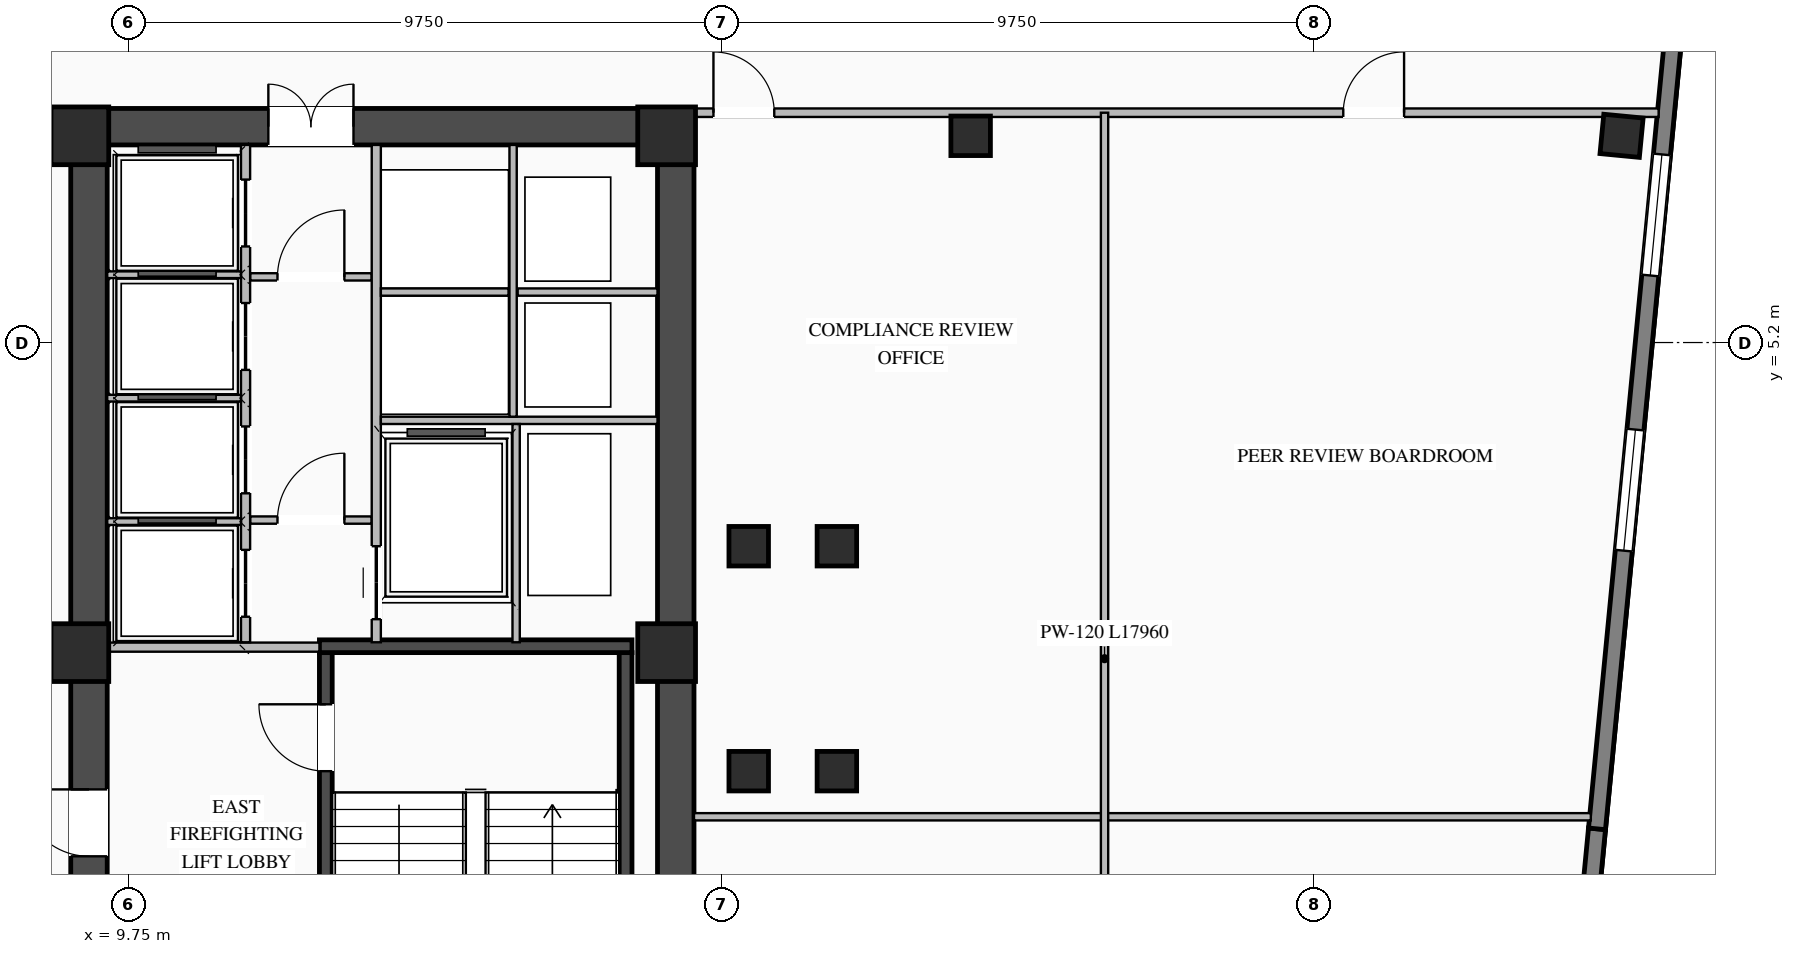
"""IFC4 building model, lengths in metres.
Left out: names, types, materials, properties, quantities, classifications, styles, units other than length and angle.
Written with IfcOpenShell. Run it as: python <this file> out.ifc"""

import sys

from ifc_helpers import new_model, si_unit, direction, frame, frame_2d, origin, origin_2d, place, context, subcontext, project, spatial, rectangle, i_section, extrude, element, fill, save


model = new_model("IFC4")
c1 = context("Model", 3, precision=1e-05, world=origin(), true_north=direction((0.0, 1.0)))
c2 = subcontext(c1, "Body", "Model", "MODEL_VIEW")
j1 = project(units=[si_unit("LENGTHUNIT", "METRE"), si_unit("PLANEANGLEUNIT", "RADIAN")], contexts=[c1])
p1 = place(None, origin())
s1 = spatial("IfcSite", under=j1, at=p1, CompositionType="ELEMENT")
p2 = place(p1, origin())
s2 = spatial("IfcBuilding", under=s1, at=p2, CompositionType="ELEMENT")
p3 = place(p2, frame((0.0, 0.0, 188.0)))
s3 = spatial("IfcBuildingStorey", under=s2, at=p3, CompositionType="ELEMENT", Elevation=188.0)
p4 = place(p3, frame((8.8, 8.75, 0.0), z_axis=(0.0, 0.0, 1.0), x_axis=(1.0, 0.0, 0.0)))
e1 = element("IfcWall", 1, at=p4, inside=s3, PredefinedType="SHEAR", context=c2, shape_type="SweptSolid", body=[
    extrude(rectangle(XDim=10.25, YDim=0.6, at=frame_2d((5.125, 0.0))), origin(), (0.0, 0.0, 1.0), 3.27),
])
p5 = place(p4, frame((3.25, 0.0, 0.0)))
e2 = element("IfcOpeningElement", 2, at=p5, cuts=e1, PredefinedType="OPENING", context=c2, shape_type="SweptSolid", body=[
    extrude(rectangle(XDim=1.4, YDim=2.05, at=frame_2d((0.7, 1.025))), frame((0.0, 0.31, 0.0), z_axis=(0.0, -1.0, 0.0), x_axis=(1.0, 0.0, 0.0)), (0.0, 0.0, 1.0), 0.62),
])
p6 = place(p3, frame((9.1, -8.45, 0.0), z_axis=(0.0, 0.0, 1.0), x_axis=(0.0, 1.0, 0.0)))
e3 = element("IfcWall", 3, at=p6, inside=s3, PredefinedType="SHEAR", context=c2, shape_type="SweptSolid", body=[
    extrude(rectangle(XDim=16.9, YDim=0.6, at=frame_2d((8.45, 0.0))), origin(), (0.0, 0.0, 1.0), 3.27),
])
p7 = place(p6, frame((5.2, 0.0, 0.0)))
e4 = element("IfcOpeningElement", 4, at=p7, cuts=e3, PredefinedType="OPENING", context=c2, shape_type="SweptSolid", body=[
    extrude(rectangle(XDim=1.1, YDim=2.08, at=frame_2d((0.55, 1.04))), frame((0.0, 0.31, 0.0), z_axis=(0.0, -1.0, 0.0), x_axis=(1.0, 0.0, 0.0)), (0.0, 0.0, 1.0), 0.62),
])
p8 = place(p3, frame((18.75, -8.45, 0.0), z_axis=(0.0, 0.0, 1.0), x_axis=(0.0, 1.0, 0.0)))
e5 = element("IfcWall", 5, at=p8, inside=s3, PredefinedType="SHEAR", context=c2, shape_type="SweptSolid", body=[
    extrude(rectangle(XDim=16.9, YDim=0.6, at=frame_2d((8.45, 0.0))), origin(), (0.0, 0.0, 1.0), 3.27),
])
p9 = place(p3, frame((12.995, -8.1, 0.0), z_axis=(0.0, 0.0, 1.0), x_axis=(0.0, 1.0, 0.0)))
e6 = element("IfcWall", 6, at=p9, inside=s3, PredefinedType="SHEAR", context=c2, shape_type="SweptSolid", body=[
    extrude(rectangle(XDim=8.2, YDim=0.21, at=frame_2d((4.1, 0.0))), origin(), (0.0, 0.0, 1.0), 3.27),
])
p10 = place(p9, frame((6.25, 0.0, 0.0)))
e7 = element("IfcOpeningElement", 7, at=p10, cuts=e6, PredefinedType="OPENING", context=c2, shape_type="SweptSolid", body=[
    extrude(rectangle(XDim=1.1, YDim=2.15, at=frame_2d((0.55, 1.075))), frame((0.0, 0.115, 0.0), z_axis=(0.0, -1.0, 0.0), x_axis=(1.0, 0.0, 0.0)), (0.0, 0.0, 1.0), 0.23),
])
p11 = place(p3, frame((17.925, -8.1, 0.0), z_axis=(0.0, 0.0, 1.0), x_axis=(0.0, 1.0, 0.0)))
e8 = element("IfcWall", 8, at=p11, inside=s3, PredefinedType="SHEAR", context=c2, shape_type="SweptSolid", body=[
    extrude(rectangle(XDim=8.2, YDim=0.21, at=frame_2d((4.1, 0.0))), origin(), (0.0, 0.0, 1.0), 3.27),
])
p12 = place(p3, frame((18.03, 0.205, 0.0), z_axis=(0.0, 0.0, 1.0), x_axis=(-1.0, 0.0, 0.0)))
e9 = element("IfcWall", 9, at=p12, inside=s3, PredefinedType="SHEAR", context=c2, shape_type="SweptSolid", body=[
    extrude(rectangle(XDim=5.14, YDim=0.21, at=frame_2d((2.57, 0.0))), origin(), (0.0, 0.0, 1.0), 3.27),
])
for number, where, z_axis, x_axis in (
    (10, (8.95, 0.1, 0.0), (0.0, 0.0, 1.0), (1.0, 0.0, 0.0)),
    (11, (8.95, 8.6, 0.0), (0.0, 0.0, 1.0), (1.0, 0.0, 0.0)),
    (12, (18.6, 0.1, 0.0), (0.0, 0.0, 1.0), (1.0, 0.0, 0.0)),
    (13, (18.6, 8.6, 0.0), (0.0, 0.0, 1.0), (1.0, 0.0, 0.0)),
):
    element("IfcColumn", number, at=place(p3, frame(where, z_axis=z_axis, x_axis=x_axis)), inside=s3, PredefinedType="COLUMN", context=c2, shape_type="SweptSolid", body=[
        extrude(rectangle(XDim=0.95, YDim=0.95, at=origin_2d()), origin(), (0.0, 0.0, 1.0), 3.45),
    ])
for number, where, z_axis, x_axis in (
    (14, (19.95, -1.85, 0.0), (0.0, 0.0, 1.0), (1.0, 0.0, 0.0)),
    (15, (19.95, 1.85, 0.0), (0.0, 0.0, 1.0), (1.0, 0.0, 0.0)),
    (16, (21.4, -1.85, 0.0), (0.0, 0.0, 1.0), (1.0, 0.0, 0.0)),
    (17, (21.4, 1.85, 0.0), (0.0, 0.0, 1.0), (1.0, 0.0, 0.0)),
    (18, (23.6, 8.6, 0.0), (0.0, 0.0, 1.0), (1.0, 0.0, 0.0)),
    (19, (34.305, 8.6, 0.0), (0.0, 0.0, 1.0), (0.995, -0.096, 0.0)),
):
    element("IfcColumn", number, at=place(p3, frame(where, z_axis=z_axis, x_axis=x_axis)), inside=s3, PredefinedType="COLUMN", context=c2, shape_type="SweptSolid", body=[
        extrude(i_section(OverallWidth=0.65, OverallDepth=0.65, WebThickness=0.028, FlangeThickness=0.04, at=origin_2d()), origin(), (0.0, 0.0, 1.0), 3.45),
    ])
p13 = place(p3, frame((33.901, -2.798, 0.0), z_axis=(0.0, 0.0, 1.0), x_axis=(-0.095853434568, -0.99539545864, 0.0)))
e20 = element("IfcWall", 20, at=p13, inside=s3, PredefinedType="STANDARD", context=c2, shape_type="SweptSolid", body=[
    extrude(rectangle(XDim=16.79, YDim=0.28, at=frame_2d((8.395, 0.0))), origin(), (0.0, 0.0, 1.0), 3.25),
])
p14 = place(p13, frame((3.547, 0.0, 0.76)))
e21 = element("IfcOpeningElement", 21, at=p14, cuts=e20, PredefinedType="OPENING", context=c2, shape_type="SweptSolid", body=[
    extrude(rectangle(XDim=2.0, YDim=2.05, at=frame_2d((1.0, 1.025))), frame((0.0, 0.15, 0.0), z_axis=(0.0, -1.0, 0.0), x_axis=(1.0, 0.0, 0.0)), (0.0, 0.0, 1.0), 0.3),
])
p15 = place(p13, frame((10.193, 0.0, 0.76)))
e22 = element("IfcOpeningElement", 22, at=p15, cuts=e20, PredefinedType="OPENING", context=c2, shape_type="SweptSolid", body=[
    extrude(rectangle(XDim=2.0, YDim=2.05, at=frame_2d((1.0, 1.025))), frame((0.0, 0.15, 0.0), z_axis=(0.0, -1.0, 0.0), x_axis=(1.0, 0.0, 0.0)), (0.0, 0.0, 1.0), 0.3),
])
p16 = place(p3, frame((35.51, 13.914, 0.0), z_axis=(0.0, 0.0, 1.0), x_axis=(-0.095839027265, -0.995396845913, 0.0)))
e23 = element("IfcWall", 23, at=p16, inside=s3, PredefinedType="STANDARD", context=c2, shape_type="SweptSolid", body=[
    extrude(rectangle(XDim=16.79, YDim=0.28, at=frame_2d((8.395, 0.0))), origin(), (0.0, 0.0, 1.0), 3.25),
])
p17 = place(p16, frame((5.647, 0.0, 0.76)))
e24 = element("IfcOpeningElement", 24, at=p17, cuts=e23, PredefinedType="OPENING", context=c2, shape_type="SweptSolid", body=[
    extrude(rectangle(XDim=2.0, YDim=2.05, at=frame_2d((1.0, 1.025))), frame((0.0, 0.15, 0.0), z_axis=(0.0, -1.0, 0.0), x_axis=(1.0, 0.0, 0.0)), (0.0, 0.0, 1.0), 0.3),
])
p18 = place(p16, frame((10.193, 0.0, 0.76)))
e25 = element("IfcOpeningElement", 25, at=p18, cuts=e23, PredefinedType="OPENING", context=c2, shape_type="SweptSolid", body=[
    extrude(rectangle(XDim=2.0, YDim=2.05, at=frame_2d((1.0, 1.025))), frame((0.0, 0.15, 0.0), z_axis=(0.0, -1.0, 0.0), x_axis=(1.0, 0.0, 0.0)), (0.0, 0.0, 1.0), 0.3),
])
p19 = place(p3, frame((9.4, 0.19, 0.0), z_axis=(0.0, 0.0, 1.0), x_axis=(1.0, 0.0, 0.0)))
e26 = element("IfcWall", 26, at=p19, inside=s3, PredefinedType="STANDARD", context=c2, shape_type="SweptSolid", body=[
    extrude(rectangle(XDim=3.49, YDim=0.15, at=frame_2d((1.745, 0.0))), origin(), (0.0, 0.0, 1.0), 2.645),
])
p20 = place(p3, frame((11.75, 2.28, 0.0), z_axis=(0.0, 0.0, 1.0), x_axis=(1.0, 0.0, 0.0)))
e27 = element("IfcWall", 27, at=p20, inside=s3, PredefinedType="STANDARD", context=c2, shape_type="SweptSolid", body=[
    extrude(rectangle(XDim=2.0, YDim=0.12, at=frame_2d((1.0, 0.0))), origin(), (0.0, 0.0, 1.0), 3.25),
])
p21 = place(p20, frame((0.45, 0.0, 0.0)))
e28 = element("IfcOpeningElement", 28, at=p21, cuts=e27, PredefinedType="OPENING", context=c2, shape_type="SweptSolid", body=[
    extrude(rectangle(XDim=1.1, YDim=2.1, at=frame_2d((0.55, 1.05))), frame((0.0, 0.07, 0.0), z_axis=(0.0, -1.0, 0.0), x_axis=(1.0, 0.0, 0.0)), (0.0, 0.0, 1.0), 0.14),
])
p22 = place(p3, frame((11.75, 6.28, 0.0), z_axis=(0.0, 0.0, 1.0), x_axis=(1.0, 0.0, 0.0)))
e29 = element("IfcWall", 29, at=p22, inside=s3, PredefinedType="STANDARD", context=c2, shape_type="SweptSolid", body=[
    extrude(rectangle(XDim=2.0, YDim=0.12, at=frame_2d((1.0, 0.0))), origin(), (0.0, 0.0, 1.0), 3.25),
])
p23 = place(p22, frame((0.45, 0.0, 0.0)))
e30 = element("IfcOpeningElement", 30, at=p23, cuts=e29, PredefinedType="OPENING", context=c2, shape_type="SweptSolid", body=[
    extrude(rectangle(XDim=1.1, YDim=2.1, at=frame_2d((0.55, 1.05))), frame((0.0, 0.07, 0.0), z_axis=(0.0, -1.0, 0.0), x_axis=(1.0, 0.0, 0.0)), (0.0, 0.0, 1.0), 0.14),
])
p24 = place(p3, frame((11.675, 0.27, 0.0), z_axis=(0.0, 0.0, 1.0), x_axis=(0.0, 1.0, 0.0)))
e31 = element("IfcWall", 31, at=p24, inside=s3, PredefinedType="STANDARD", context=c2, shape_type="SweptSolid", body=[
    extrude(rectangle(XDim=8.18, YDim=0.15, at=frame_2d((4.09, 0.0))), origin(), (0.0, 0.0, 1.0), 3.25),
])
p25 = place(p24, frame((0.42, 0.0, 0.0)))
e32 = element("IfcOpeningElement", 32, at=p25, cuts=e31, PredefinedType="OPENING", context=c2, shape_type="SweptSolid", body=[
    extrude(rectangle(XDim=1.1, YDim=2.1, at=frame_2d((0.55, 1.05))), frame((0.0, 0.085, 0.0), z_axis=(0.0, -1.0, 0.0), x_axis=(1.0, 0.0, 0.0)), (0.0, 0.0, 1.0), 0.17),
])
p26 = place(p24, frame((2.45, 0.0, 0.0)))
e33 = element("IfcOpeningElement", 33, at=p26, cuts=e31, PredefinedType="OPENING", context=c2, shape_type="SweptSolid", body=[
    extrude(rectangle(XDim=1.1, YDim=2.1, at=frame_2d((0.55, 1.05))), frame((0.0, 0.085, 0.0), z_axis=(0.0, -1.0, 0.0), x_axis=(1.0, 0.0, 0.0)), (0.0, 0.0, 1.0), 0.17),
])
p27 = place(p24, frame((4.48, 0.0, 0.0)))
e34 = element("IfcOpeningElement", 34, at=p27, cuts=e31, PredefinedType="OPENING", context=c2, shape_type="SweptSolid", body=[
    extrude(rectangle(XDim=1.1, YDim=2.1, at=frame_2d((0.55, 1.05))), frame((0.0, 0.085, 0.0), z_axis=(0.0, -1.0, 0.0), x_axis=(1.0, 0.0, 0.0)), (0.0, 0.0, 1.0), 0.17),
])
p28 = place(p24, frame((6.51, 0.0, 0.0)))
e35 = element("IfcOpeningElement", 35, at=p28, cuts=e31, PredefinedType="OPENING", context=c2, shape_type="SweptSolid", body=[
    extrude(rectangle(XDim=1.1, YDim=2.1, at=frame_2d((0.55, 1.05))), frame((0.0, 0.085, 0.0), z_axis=(0.0, -1.0, 0.0), x_axis=(1.0, 0.0, 0.0)), (0.0, 0.0, 1.0), 0.17),
])
for number, where, z_axis, x_axis in (
    (36, (9.4, 2.255, 0.0), (0.0, 0.0, 1.0), (1.0, 0.0, 0.0)),
    (37, (9.4, 4.285, 0.0), (0.0, 0.0, 1.0), (1.0, 0.0, 0.0)),
    (38, (9.4, 6.315, 0.0), (0.0, 0.0, 1.0), (1.0, 0.0, 0.0)),
):
    element("IfcWall", number, at=place(p3, frame(where, z_axis=z_axis, x_axis=x_axis)), inside=s3, PredefinedType="STANDARD", context=c2, shape_type="SweptSolid", body=[
        extrude(rectangle(XDim=2.2, YDim=0.11, at=frame_2d((1.1, 0.0))), origin(), (0.0, 0.0, 1.0), 3.25),
    ])
p29 = place(p3, frame((13.825, 0.27, 0.0), z_axis=(0.0, 0.0, 1.0), x_axis=(0.0, 1.0, 0.0)))
e39 = element("IfcWall", 39, at=p29, inside=s3, PredefinedType="STANDARD", context=c2, shape_type="SweptSolid", body=[
    extrude(rectangle(XDim=8.18, YDim=0.15, at=frame_2d((4.09, 0.0))), origin(), (0.0, 0.0, 1.0), 3.25),
])
p30 = place(p29, frame((0.38, 0.0, 0.0)))
e40 = element("IfcOpeningElement", 40, at=p30, cuts=e39, PredefinedType="OPENING", context=c2, shape_type="SweptSolid", body=[
    extrude(rectangle(XDim=1.2, YDim=2.1, at=frame_2d((0.6, 1.05))), frame((0.0, 0.085, 0.0), z_axis=(0.0, -1.0, 0.0), x_axis=(1.0, 0.0, 0.0)), (0.0, 0.0, 1.0), 0.17),
])
p31 = place(p3, frame((13.9, 3.92, 0.0), z_axis=(0.0, 0.0, 1.0), x_axis=(1.0, 0.0, 0.0)))
e41 = element("IfcWall", 41, at=p31, inside=s3, PredefinedType="STANDARD", context=c2, shape_type="SweptSolid", body=[
    extrude(rectangle(XDim=4.55, YDim=0.12, at=frame_2d((2.275, 0.0))), origin(), (0.0, 0.0, 1.0), 3.25),
])
p32 = place(p3, frame((16.15, 6.03, 0.0), z_axis=(0.0, 0.0, 1.0), x_axis=(1.0, 0.0, 0.0)))
e42 = element("IfcWall", 42, at=p32, inside=s3, PredefinedType="STANDARD", context=c2, shape_type="SweptSolid", body=[
    extrude(rectangle(XDim=2.3, YDim=0.12, at=frame_2d((1.15, 0.0))), origin(), (0.0, 0.0, 1.0), 3.25),
])
p33 = place(p3, frame((16.075, 3.98, 0.0), z_axis=(0.0, 0.0, 1.0), x_axis=(0.0, 1.0, 0.0)))
e43 = element("IfcWall", 43, at=p33, inside=s3, PredefinedType="STANDARD", context=c2, shape_type="SweptSolid", body=[
    extrude(rectangle(XDim=4.47, YDim=0.12, at=frame_2d((2.235, 0.0))), origin(), (0.0, 0.0, 1.0), 3.25),
])
p34 = place(p3, frame((13.9, 6.03, 0.0), z_axis=(0.0, 0.0, 1.0), x_axis=(1.0, 0.0, 0.0)))
e44 = element("IfcWall", 44, at=p34, inside=s3, PredefinedType="STANDARD", context=c2, shape_type="SweptSolid", body=[
    extrude(rectangle(XDim=2.1, YDim=0.12, at=frame_2d((1.05, 0.0))), origin(), (0.0, 0.0, 1.0), 3.25),
])
p35 = place(p3, frame((16.125, 0.27, 0.0), z_axis=(0.0, 0.0, 1.0), x_axis=(0.0, 1.0, 0.0)))
e45 = element("IfcWall", 45, at=p35, inside=s3, PredefinedType="STANDARD", context=c2, shape_type="SweptSolid", body=[
    extrude(rectangle(XDim=3.59, YDim=0.12, at=frame_2d((1.795, 0.0))), origin(), (0.0, 0.0, 1.0), 3.25),
])
p36 = place(p3, frame((19.05, 8.98, 0.0), z_axis=(0.0, 0.0, 1.0), x_axis=(1.0, 0.0, 0.0)))
e46 = element("IfcWall", 46, at=p36, inside=s3, PredefinedType="STANDARD", context=c2, shape_type="SweptSolid", body=[
    extrude(rectangle(XDim=15.864, YDim=0.14, at=frame_2d((7.932, 0.0))), origin(), (0.0, 0.0, 1.0), 3.25),
])
p37 = place(p36, frame((0.32, 0.0, 0.0)))
e47 = element("IfcOpeningElement", 47, at=p37, cuts=e46, PredefinedType="OPENING", context=c2, shape_type="SweptSolid", body=[
    extrude(rectangle(XDim=1.0, YDim=2.08, at=frame_2d((0.5, 1.04))), frame((0.0, 0.08, 0.0), z_axis=(0.0, -1.0, 0.0), x_axis=(1.0, 0.0, 0.0)), (0.0, 0.0, 1.0), 0.16),
])
p38 = place(p36, frame((10.678, 0.0, 0.0)))
e48 = element("IfcOpeningElement", 48, at=p38, cuts=e46, PredefinedType="OPENING", context=c2, shape_type="SweptSolid", body=[
    extrude(rectangle(XDim=1.0, YDim=2.08, at=frame_2d((0.5, 1.04))), frame((0.0, 0.08, 0.0), z_axis=(0.0, -1.0, 0.0), x_axis=(1.0, 0.0, 0.0)), (0.0, 0.0, 1.0), 0.16),
])
p39 = place(p3, frame((19.05, -2.6, 0.0), z_axis=(0.0, 0.0, 1.0), x_axis=(1.0, 0.0, 0.0)))
e49 = element("IfcWall", 49, at=p39, inside=s3, PredefinedType="STANDARD", context=c2, shape_type="SweptSolid", body=[
    extrude(rectangle(XDim=14.749, YDim=0.12, at=frame_2d((7.375, 0.0))), origin(), (0.0, 0.0, 1.0), 3.25),
])
p40 = place(p3, frame((25.802, -8.98, 0.0), z_axis=(0.0, 0.0, 1.0), x_axis=(0.0, 1.0, 0.0)))
e50 = element("IfcWall", 50, at=p40, inside=s3, PredefinedType="STANDARD", context=c2, shape_type="SweptSolid", body=[
    extrude(rectangle(XDim=17.96, YDim=0.12, at=frame_2d((8.98, 0.0))), origin(), (0.0, 0.0, 1.0), 3.25),
])
p41 = place(p17, origin())
e51 = element("IfcWindow", 51, at=p41, inside=s3, PartitioningType="DOUBLE_PANEL_VERTICAL", PredefinedType="WINDOW", context=c2, shape_type="SweptSolid", body=[
    extrude(rectangle(XDim=2.0, YDim=2.05, at=frame_2d((1.0, 1.025))), frame((0.0, 0.03, 0.0), z_axis=(0.0, -1.0, 0.0), x_axis=(1.0, 0.0, 0.0)), (0.0, 0.0, 1.0), 0.06),
])
fill(e24, e51)
p42 = place(p18, origin())
e52 = element("IfcWindow", 52, at=p42, inside=s3, PartitioningType="DOUBLE_PANEL_VERTICAL", PredefinedType="WINDOW", context=c2, shape_type="SweptSolid", body=[
    extrude(rectangle(XDim=2.0, YDim=2.05, at=frame_2d((1.0, 1.025))), frame((0.0, 0.03, 0.0), z_axis=(0.0, -1.0, 0.0), x_axis=(1.0, 0.0, 0.0)), (0.0, 0.0, 1.0), 0.06),
])
fill(e25, e52)
p43 = place(p10, origin())
e53 = element("IfcDoor", 53, at=p43, inside=s3, OperationType="SINGLE_SWING_RIGHT", PredefinedType="DOOR", context=c2, shape_type="SweptSolid", body=[
    extrude(rectangle(XDim=1.1, YDim=2.15, at=frame_2d((0.55, 1.075))), frame((0.0, 0.025, 0.0), z_axis=(0.0, -1.0, 0.0), x_axis=(1.0, 0.0, 0.0)), (0.0, 0.0, 1.0), 0.05),
])
fill(e7, e53)
p44 = place(p7, origin())
e54 = element("IfcDoor", 54, at=p44, inside=s3, OperationType="SINGLE_SWING_RIGHT", PredefinedType="DOOR", context=c2, shape_type="SweptSolid", body=[
    extrude(rectangle(XDim=1.1, YDim=2.08, at=frame_2d((0.55, 1.04))), frame((0.0, -0.205, 0.0), z_axis=(0.0, -1.0, 0.0), x_axis=(1.0, 0.0, 0.0)), (0.0, 0.0, 1.0), 0.05),
])
fill(e4, e54)
p45 = place(p21, origin())
e55 = element("IfcDoor", 55, at=p45, inside=s3, OperationType="SINGLE_SWING_RIGHT", PredefinedType="DOOR", context=c2, shape_type="SweptSolid", body=[
    extrude(rectangle(XDim=1.1, YDim=2.1, at=frame_2d((0.55, 1.05))), frame((0.0, 0.025, 0.0), z_axis=(0.0, -1.0, 0.0), x_axis=(1.0, 0.0, 0.0)), (0.0, 0.0, 1.0), 0.05),
])
fill(e28, e55)
p46 = place(p23, origin())
e56 = element("IfcDoor", 56, at=p46, inside=s3, OperationType="SINGLE_SWING_RIGHT", PredefinedType="DOOR", context=c2, shape_type="SweptSolid", body=[
    extrude(rectangle(XDim=1.1, YDim=2.1, at=frame_2d((0.55, 1.05))), frame((0.0, 0.025, 0.0), z_axis=(0.0, -1.0, 0.0), x_axis=(1.0, 0.0, 0.0)), (0.0, 0.0, 1.0), 0.05),
])
fill(e30, e56)
p47 = place(p5, origin())
e57 = element("IfcDoor", 57, at=p47, inside=s3, OperationType="DOUBLE_DOOR_SINGLE_SWING", PredefinedType="DOOR", context=c2, shape_type="SweptSolid", body=[
    extrude(rectangle(XDim=1.4, YDim=2.05, at=frame_2d((0.7, 1.025))), frame((0.0, 0.245, 0.0), z_axis=(0.0, -1.0, 0.0), x_axis=(1.0, 0.0, 0.0)), (0.0, 0.0, 1.0), 0.05),
])
fill(e2, e57)
p48 = place(p25, origin())
e58 = element("IfcDoor", 58, at=p48, inside=s3, OperationType="DOUBLE_DOOR_SLIDING", PredefinedType="DOOR", context=c2, shape_type="SweptSolid", body=[
    extrude(rectangle(XDim=1.1, YDim=2.1, at=frame_2d((0.55, 1.05))), frame((0.0, 0.025, 0.0), z_axis=(0.0, -1.0, 0.0), x_axis=(1.0, 0.0, 0.0)), (0.0, 0.0, 1.0), 0.05),
])
fill(e32, e58)
p49 = place(p26, origin())
e59 = element("IfcDoor", 59, at=p49, inside=s3, OperationType="DOUBLE_DOOR_SLIDING", PredefinedType="DOOR", context=c2, shape_type="SweptSolid", body=[
    extrude(rectangle(XDim=1.1, YDim=2.1, at=frame_2d((0.55, 1.05))), frame((0.0, 0.025, 0.0), z_axis=(0.0, -1.0, 0.0), x_axis=(1.0, 0.0, 0.0)), (0.0, 0.0, 1.0), 0.05),
])
fill(e33, e59)
p50 = place(p27, origin())
e60 = element("IfcDoor", 60, at=p50, inside=s3, OperationType="DOUBLE_DOOR_SLIDING", PredefinedType="DOOR", context=c2, shape_type="SweptSolid", body=[
    extrude(rectangle(XDim=1.1, YDim=2.1, at=frame_2d((0.55, 1.05))), frame((0.0, 0.025, 0.0), z_axis=(0.0, -1.0, 0.0), x_axis=(1.0, 0.0, 0.0)), (0.0, 0.0, 1.0), 0.05),
])
fill(e34, e60)
p51 = place(p28, origin())
e61 = element("IfcDoor", 61, at=p51, inside=s3, OperationType="DOUBLE_DOOR_SLIDING", PredefinedType="DOOR", context=c2, shape_type="SweptSolid", body=[
    extrude(rectangle(XDim=1.1, YDim=2.1, at=frame_2d((0.55, 1.05))), frame((0.0, 0.025, 0.0), z_axis=(0.0, -1.0, 0.0), x_axis=(1.0, 0.0, 0.0)), (0.0, 0.0, 1.0), 0.05),
])
fill(e35, e61)
p52 = place(p30, origin())
e62 = element("IfcDoor", 62, at=p52, inside=s3, OperationType="DOUBLE_DOOR_SLIDING", PredefinedType="DOOR", context=c2, shape_type="SweptSolid", body=[
    extrude(rectangle(XDim=1.2, YDim=2.1, at=frame_2d((0.6, 1.05))), frame((0.0, 0.025, 0.0), z_axis=(0.0, -1.0, 0.0), x_axis=(1.0, 0.0, 0.0)), (0.0, 0.0, 1.0), 0.05),
])
fill(e40, e62)
p53 = place(p37, origin())
e63 = element("IfcDoor", 63, at=p53, inside=s3, OperationType="SINGLE_SWING_LEFT", PredefinedType="DOOR", context=c2, shape_type="SweptSolid", body=[
    extrude(rectangle(XDim=1.0, YDim=2.08, at=frame_2d((0.5, 1.04))), frame((0.0, 0.025, 0.0), z_axis=(0.0, -1.0, 0.0), x_axis=(1.0, 0.0, 0.0)), (0.0, 0.0, 1.0), 0.05),
])
fill(e47, e63)
p54 = place(p38, origin())
e64 = element("IfcDoor", 64, at=p54, inside=s3, OperationType="SINGLE_SWING_RIGHT", PredefinedType="DOOR", context=c2, shape_type="SweptSolid", body=[
    extrude(rectangle(XDim=1.0, YDim=2.08, at=frame_2d((0.5, 1.04))), frame((0.0, 0.025, 0.0), z_axis=(0.0, -1.0, 0.0), x_axis=(1.0, 0.0, 0.0)), (0.0, 0.0, 1.0), 0.05),
])
fill(e48, e64)
save(model, sys.argv[1])
